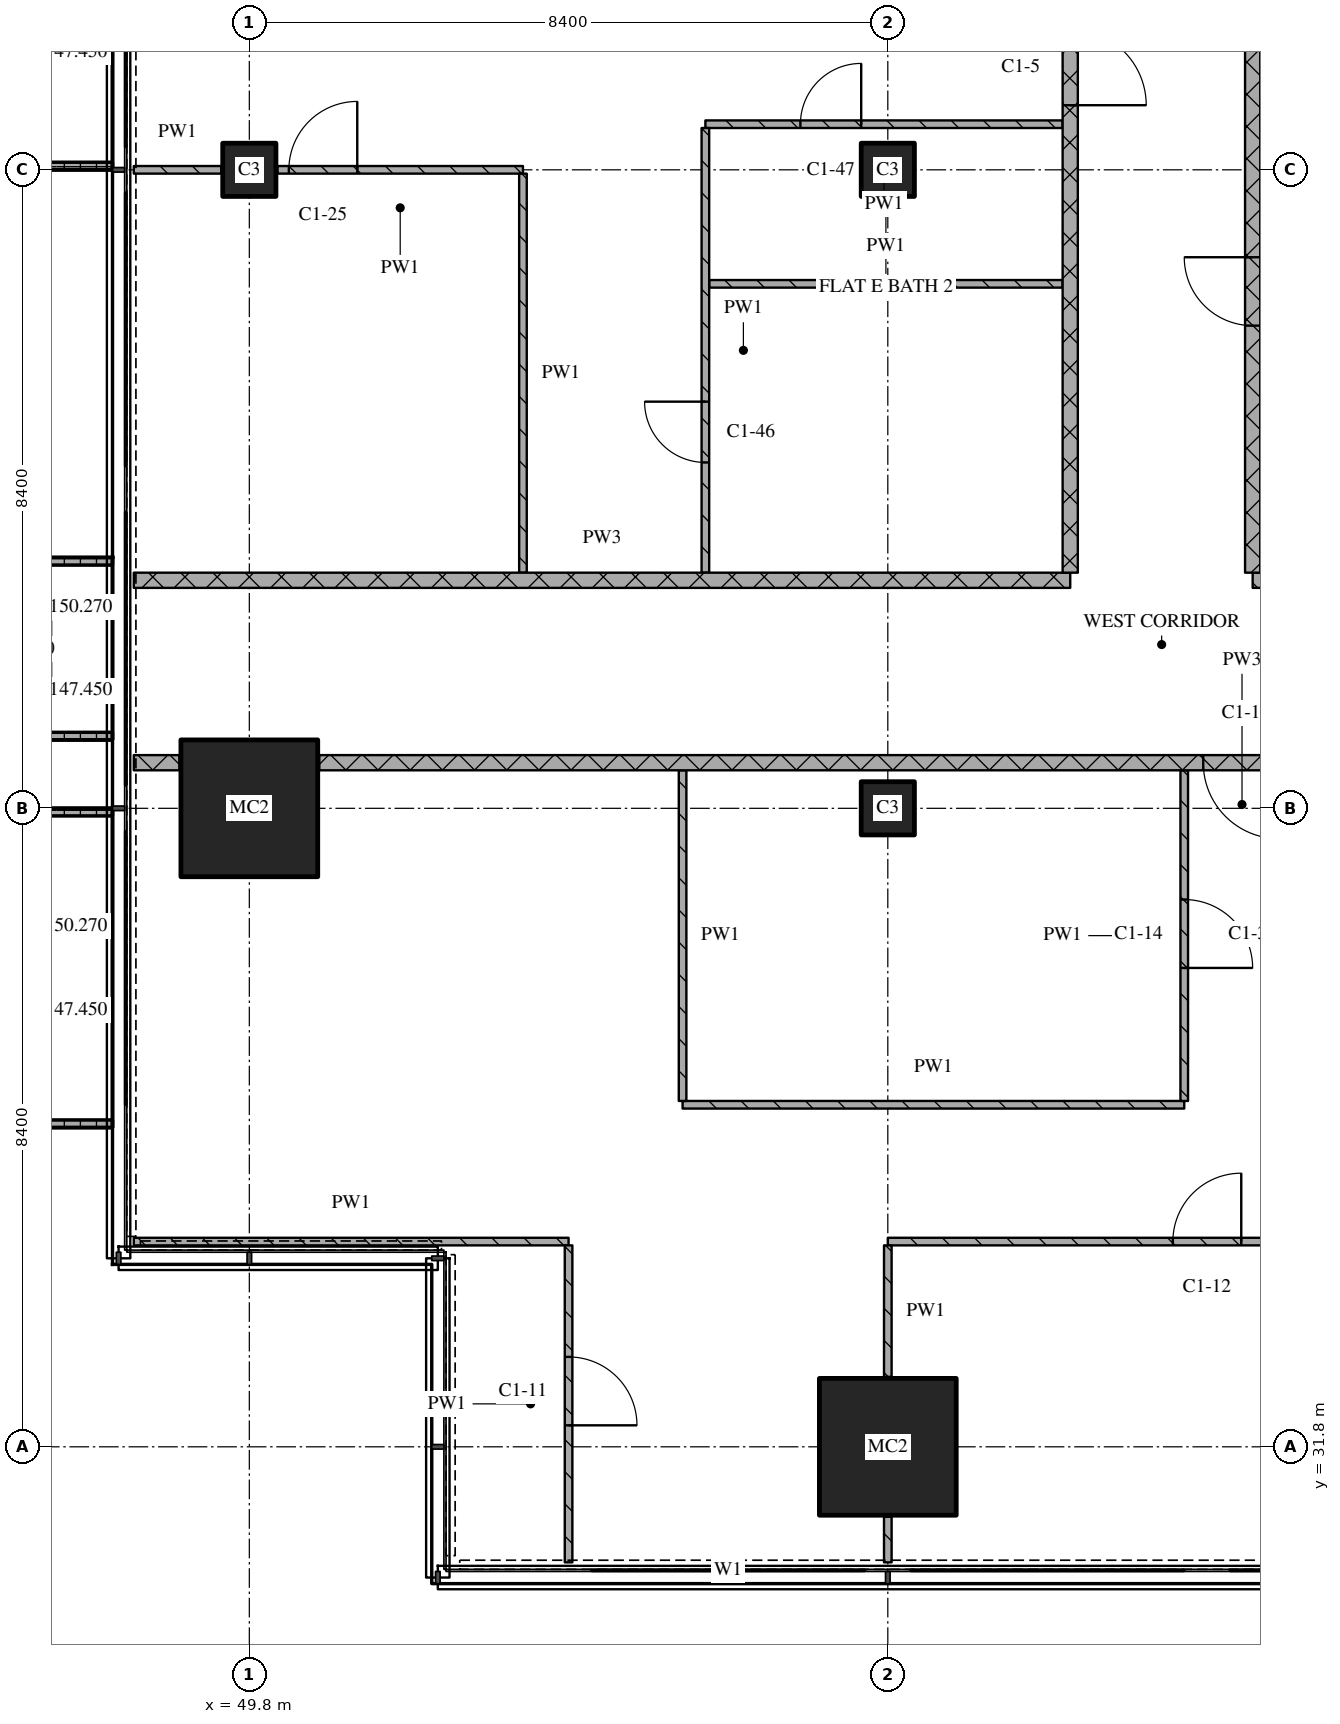
"""IFC4 building model, lengths in metres.
Left out: names, types, materials, properties, quantities, classifications, styles, units other than length and angle.
Written with IfcOpenShell. Run it as: python <this file> out.ifc"""

import sys

from ifc_helpers import new_model, si_unit, direction, frame, frame_2d, origin, origin_2d, place, context, subcontext, project, spatial, polyline, rectangle, outline, extrude, element, fill, save


model = new_model("IFC4")
c1 = context("Model", 3, precision=1e-05, world=origin(), true_north=direction((0.0, 1.0)))
c2 = subcontext(c1, "Body", "Model", "MODEL_VIEW")
j1 = project(units=[si_unit("LENGTHUNIT", "METRE"), si_unit("PLANEANGLEUNIT", "RADIAN")], contexts=[c1])
p1 = place(None, origin())
s1 = spatial("IfcSite", under=j1, at=p1, CompositionType="ELEMENT")
p2 = place(p1, origin())
s2 = spatial("IfcBuilding", under=s1, at=p2, CompositionType="ELEMENT")
p3 = place(p2, frame((0.0, 0.0, 147.45)))
s3 = spatial("IfcBuildingStorey", under=s2, at=p3, CompositionType="ELEMENT", Elevation=147.45)
p4 = place(p3, frame((49.8, 40.2, 0.0), z_axis=(0.0, 0.0, 1.0), x_axis=(1.0, 0.0, 0.0)))
e1 = element("IfcColumn", 1, at=p4, inside=s3, PredefinedType="COLUMN", context=c2, shape_type="SweptSolid", body=[
    extrude(rectangle(XDim=1.8, YDim=1.8, at=origin_2d()), origin(), (0.0, 0.0, 1.0), 3.6),
])
p5 = place(p3, frame((49.8, 48.6, 0.0), z_axis=(0.0, 0.0, 1.0), x_axis=(1.0, 0.0, 0.0)))
e2 = element("IfcColumn", 2, at=p5, inside=s3, PredefinedType="COLUMN", context=c2, shape_type="SweptSolid", body=[
    extrude(rectangle(XDim=0.7, YDim=0.7, at=origin_2d()), origin(), (0.0, 0.0, 1.0), 3.6),
])
p6 = place(p3, frame((58.2, 31.8, 0.0), z_axis=(0.0, 0.0, 1.0), x_axis=(1.0, 0.0, 0.0)))
e3 = element("IfcColumn", 3, at=p6, inside=s3, PredefinedType="COLUMN", context=c2, shape_type="SweptSolid", body=[
    extrude(rectangle(XDim=1.8, YDim=1.8, at=origin_2d()), origin(), (0.0, 0.0, 1.0), 3.6),
])
for number, where, z_axis, x_axis in (
    (4, (58.2, 40.2, 0.0), (0.0, 0.0, 1.0), (1.0, 0.0, 0.0)),
    (5, (58.2, 48.6, 0.0), (0.0, 0.0, 1.0), (1.0, 0.0, 0.0)),
):
    element("IfcColumn", number, at=place(p3, frame(where, z_axis=z_axis, x_axis=x_axis)), inside=s3, PredefinedType="COLUMN", context=c2, shape_type="SweptSolid", body=[
        extrude(rectangle(XDim=0.7, YDim=0.7, at=origin_2d()), origin(), (0.0, 0.0, 1.0), 3.6),
    ])
p7 = place(p3, origin())
e6 = element("IfcWall", 6, at=p7, inside=s3, PredefinedType="SOLIDWALL", context=c2, shape_type="SweptSolid", body=[
    extrude(outline(polyline([(48.0, 52.8), (48.0, 52.7), (46.367, 52.7), (46.367, 48.7), (48.0, 48.7), (48.0, 48.6), (46.267, 48.6), (46.267, 52.8), (48.0, 52.8)])), origin(), (0.0, 0.0, 1.0), 1.0),
])
p8 = place(p3, origin())
e7 = element("IfcWall", 7, at=p8, inside=s3, PredefinedType="SOLIDWALL", context=c2, shape_type="SweptSolid", body=[
    extrude(outline(polyline([(48.0, 43.5), (48.0, 43.4), (46.5, 43.4), (46.5, 41.2), (48.0, 41.2), (48.0, 41.1), (46.4, 41.1), (46.4, 43.5), (48.0, 43.5)])), origin(), (0.0, 0.0, 1.0), 1.0),
])
p9 = place(p3, origin())
e8 = element("IfcWall", 8, at=p9, inside=s3, PredefinedType="SOLIDWALL", context=c2, shape_type="SweptSolid", body=[
    extrude(outline(polyline([(48.0, 40.2), (48.0, 40.1), (46.367, 40.1), (46.367, 36.1), (48.0, 36.1), (48.0, 36.0), (46.267, 36.0), (46.267, 40.2), (48.0, 40.2)])), origin(), (0.0, 0.0, 1.0), 1.0),
])
p10 = place(p3, frame((48.28, 34.5, 0.0), z_axis=(0.0, 0.0, 1.0), x_axis=(1.0, 0.0, 0.0)))
e9 = element("IfcWall", 9, at=p10, inside=s3, PredefinedType="PARTITIONING", context=c2, shape_type="SweptSolid", body=[
    extrude(rectangle(XDim=5.72, YDim=0.1, at=frame_2d((2.86, 0.0))), origin(), (0.0, 0.0, 1.0), 3.32),
])
p11 = place(p3, frame((74.9, 34.5, 0.0), z_axis=(0.0, 0.0, 1.0), x_axis=(-1.0, 0.0, 0.0)))
e10 = element("IfcWall", 10, at=p11, inside=s3, PredefinedType="PARTITIONING", context=c2, shape_type="SweptSolid", body=[
    extrude(rectangle(XDim=16.7, YDim=0.1, at=frame_2d((8.35, 0.0))), origin(), (0.0, 0.0, 1.0), 3.32),
])
p12 = place(p11, frame((3.65, 0.0, 0.0)))
e11 = element("IfcOpeningElement", 11, at=p12, cuts=e10, PredefinedType="OPENING", context=c2, shape_type="SweptSolid", body=[
    extrude(rectangle(XDim=0.9, YDim=2.1, at=frame_2d((0.45, 1.05))), frame((0.0, 0.06, 0.0), z_axis=(0.0, -1.0, 0.0), x_axis=(1.0, 0.0, 0.0)), (0.0, 0.0, 1.0), 0.12),
])
p13 = place(p11, frame((12.05, 0.0, 0.0)))
e12 = element("IfcOpeningElement", 12, at=p13, cuts=e10, PredefinedType="OPENING", context=c2, shape_type="SweptSolid", body=[
    extrude(rectangle(XDim=0.9, YDim=2.1, at=frame_2d((0.45, 1.05))), frame((0.0, 0.06, 0.0), z_axis=(0.0, -1.0, 0.0), x_axis=(1.0, 0.0, 0.0)), (0.0, 0.0, 1.0), 0.12),
])
p14 = place(p3, frame((55.5, 36.3, 0.0), z_axis=(0.0, 0.0, 1.0), x_axis=(1.0, 0.0, 0.0)))
e13 = element("IfcWall", 13, at=p14, inside=s3, PredefinedType="PARTITIONING", context=c2, shape_type="SweptSolid", body=[
    extrude(rectangle(XDim=6.6, YDim=0.1, at=frame_2d((3.3, 0.0))), origin(), (0.0, 0.0, 1.0), 3.32),
])
p15 = place(p3, frame((48.28, 40.8, 0.0), z_axis=(0.0, 0.0, 1.0), x_axis=(1.0, 0.0, 0.0)))
e14 = element("IfcWall", 14, at=p15, inside=s3, PredefinedType="PARTITIONING", context=c2, shape_type="SweptSolid", body=[
    extrude(rectangle(XDim=0.6, YDim=0.2, at=frame_2d((0.3, 0.0))), origin(), (0.0, 0.0, 1.0), 3.32),
])
p16 = place(p3, frame((75.0, 40.8, 0.0), z_axis=(0.0, 0.0, 1.0), x_axis=(-1.0, 0.0, 0.0)))
e15 = element("IfcWall", 15, at=p16, inside=s3, PredefinedType="PARTITIONING", context=c2, shape_type="SweptSolid", body=[
    extrude(rectangle(XDim=24.28, YDim=0.2, at=frame_2d((12.14, 0.0))), origin(), (0.0, 0.0, 1.0), 3.32),
])
p17 = place(p16, frame((11.65, 0.0, 0.0)))
e16 = element("IfcOpeningElement", 16, at=p17, cuts=e15, PredefinedType="OPENING", context=c2, shape_type="SweptSolid", body=[
    extrude(rectangle(XDim=1.0, YDim=2.1, at=frame_2d((0.5, 1.05))), frame((0.0, 0.11, 0.0), z_axis=(0.0, -1.0, 0.0), x_axis=(1.0, 0.0, 0.0)), (0.0, 0.0, 1.0), 0.22),
])
p18 = place(p3, frame((48.28, 43.2, 0.0), z_axis=(0.0, 0.0, 1.0), x_axis=(1.0, 0.0, 0.0)))
e17 = element("IfcWall", 17, at=p18, inside=s3, PredefinedType="PARTITIONING", context=c2, shape_type="SweptSolid", body=[
    extrude(rectangle(XDim=12.32, YDim=0.2, at=frame_2d((6.16, 0.0))), origin(), (0.0, 0.0, 1.0), 3.32),
])
p19 = place(p3, frame((63.0, 43.2, 0.0), z_axis=(0.0, 0.0, 1.0), x_axis=(1.0, 0.0, 0.0)))
e18 = element("IfcWall", 18, at=p19, inside=s3, PredefinedType="PARTITIONING", context=c2, shape_type="SweptSolid", body=[
    extrude(rectangle(XDim=5.2, YDim=0.2, at=frame_2d((2.6, 0.0))), origin(), (0.0, 0.0, 1.0), 3.32),
])
p20 = place(p3, frame((55.85, 47.1, 0.0), z_axis=(0.0, 0.0, 1.0), x_axis=(1.0, 0.0, 0.0)))
e19 = element("IfcWall", 19, at=p20, inside=s3, PredefinedType="PARTITIONING", context=c2, shape_type="SweptSolid", body=[
    extrude(rectangle(XDim=4.65, YDim=0.1, at=frame_2d((2.325, 0.0))), origin(), (0.0, 0.0, 1.0), 3.32),
])
p21 = place(p3, frame((48.28, 48.6, 0.0), z_axis=(0.0, 0.0, 1.0), x_axis=(1.0, 0.0, 0.0)))
e20 = element("IfcWall", 20, at=p21, inside=s3, PredefinedType="PARTITIONING", context=c2, shape_type="SweptSolid", body=[
    extrude(rectangle(XDim=1.15, YDim=0.1, at=frame_2d((0.575, 0.0))), origin(), (0.0, 0.0, 1.0), 3.32),
])
p22 = place(p3, frame((53.4, 48.6, 0.0), z_axis=(0.0, 0.0, 1.0), x_axis=(-1.0, 0.0, 0.0)))
e21 = element("IfcWall", 21, at=p22, inside=s3, PredefinedType="PARTITIONING", context=c2, shape_type="SweptSolid", body=[
    extrude(rectangle(XDim=3.23, YDim=0.1, at=frame_2d((1.615, 0.0))), origin(), (0.0, 0.0, 1.0), 3.32),
])
p23 = place(p22, frame((2.18, 0.0, 0.0)))
e22 = element("IfcOpeningElement", 22, at=p23, cuts=e21, PredefinedType="OPENING", context=c2, shape_type="SweptSolid", body=[
    extrude(rectangle(XDim=0.9, YDim=2.1, at=frame_2d((0.45, 1.05))), frame((0.0, 0.06, 0.0), z_axis=(0.0, -1.0, 0.0), x_axis=(1.0, 0.0, 0.0)), (0.0, 0.0, 1.0), 0.12),
])
p24 = place(p3, frame((60.5, 49.2, 0.0), z_axis=(0.0, 0.0, 1.0), x_axis=(-1.0, 0.0, 0.0)))
e23 = element("IfcWall", 23, at=p24, inside=s3, PredefinedType="PARTITIONING", context=c2, shape_type="SweptSolid", body=[
    extrude(rectangle(XDim=4.7, YDim=0.1, at=frame_2d((2.35, 0.0))), origin(), (0.0, 0.0, 1.0), 3.32),
])
p25 = place(p24, frame((2.65, 0.0, 0.0)))
e24 = element("IfcOpeningElement", 24, at=p25, cuts=e23, PredefinedType="OPENING", context=c2, shape_type="SweptSolid", body=[
    extrude(rectangle(XDim=0.8, YDim=2.1, at=frame_2d((0.4, 1.05))), frame((0.0, 0.06, 0.0), z_axis=(0.0, -1.0, 0.0), x_axis=(1.0, 0.0, 0.0)), (0.0, 0.0, 1.0), 0.12),
])
p26 = place(p3, frame((53.4, 48.55, 0.0), z_axis=(0.0, 0.0, 1.0), x_axis=(0.0, -1.0, 0.0)))
e25 = element("IfcWall", 25, at=p26, inside=s3, PredefinedType="PARTITIONING", context=c2, shape_type="SweptSolid", body=[
    extrude(rectangle(XDim=5.25, YDim=0.1, at=frame_2d((2.625, 0.0))), origin(), (0.0, 0.0, 1.0), 3.32),
])
p27 = place(p3, frame((54.0, 30.28, 0.0), z_axis=(0.0, 0.0, 1.0), x_axis=(0.0, 1.0, 0.0)))
e26 = element("IfcWall", 26, at=p27, inside=s3, PredefinedType="PARTITIONING", context=c2, shape_type="SweptSolid", body=[
    extrude(rectangle(XDim=4.17, YDim=0.1, at=frame_2d((2.085, 0.0))), origin(), (0.0, 0.0, 1.0), 3.32),
])
p28 = place(p27, frame((1.803, 0.0, 0.0)))
e27 = element("IfcOpeningElement", 27, at=p28, cuts=e26, PredefinedType="OPENING", context=c2, shape_type="SweptSolid", body=[
    extrude(rectangle(XDim=0.9, YDim=2.1, at=frame_2d((0.45, 1.05))), frame((0.0, 0.06, 0.0), z_axis=(0.0, -1.0, 0.0), x_axis=(1.0, 0.0, 0.0)), (0.0, 0.0, 1.0), 0.12),
])
p29 = place(p3, frame((55.5, 40.7, 0.0), z_axis=(0.0, 0.0, 1.0), x_axis=(0.0, -1.0, 0.0)))
e28 = element("IfcWall", 28, at=p29, inside=s3, PredefinedType="PARTITIONING", context=c2, shape_type="SweptSolid", body=[
    extrude(rectangle(XDim=4.35, YDim=0.1, at=frame_2d((2.175, 0.0))), origin(), (0.0, 0.0, 1.0), 3.32),
])
p30 = place(p3, frame((55.8, 49.15, 0.0), z_axis=(0.0, 0.0, 1.0), x_axis=(0.0, -1.0, 0.0)))
e29 = element("IfcWall", 29, at=p30, inside=s3, PredefinedType="PARTITIONING", context=c2, shape_type="SweptSolid", body=[
    extrude(rectangle(XDim=5.85, YDim=0.1, at=frame_2d((2.925, 0.0))), origin(), (0.0, 0.0, 1.0), 3.32),
])
p31 = place(p30, frame((3.6, 0.0, 0.0)))
e30 = element("IfcOpeningElement", 30, at=p31, cuts=e29, PredefinedType="OPENING", context=c2, shape_type="SweptSolid", body=[
    extrude(rectangle(XDim=0.8, YDim=2.1, at=frame_2d((0.4, 1.05))), frame((0.0, 0.06, 0.0), z_axis=(0.0, -1.0, 0.0), x_axis=(1.0, 0.0, 0.0)), (0.0, 0.0, 1.0), 0.12),
])
p32 = place(p3, frame((58.2, 30.88, 0.0), z_axis=(0.0, 0.0, 1.0), x_axis=(0.0, -1.0, 0.0)))
e31 = element("IfcWall", 31, at=p32, inside=s3, PredefinedType="PARTITIONING", context=c2, shape_type="SweptSolid", body=[
    extrude(rectangle(XDim=0.6, YDim=0.1, at=frame_2d((0.3, 0.0))), origin(), (0.0, 0.0, 1.0), 3.32),
])
p33 = place(p3, frame((58.2, 34.45, 0.0), z_axis=(0.0, 0.0, 1.0), x_axis=(0.0, -1.0, 0.0)))
e32 = element("IfcWall", 32, at=p33, inside=s3, PredefinedType="PARTITIONING", context=c2, shape_type="SweptSolid", body=[
    extrude(rectangle(XDim=1.73, YDim=0.1, at=frame_2d((0.865, 0.0))), origin(), (0.0, 0.0, 1.0), 3.32),
])
p34 = place(p3, frame((60.6, 43.3, 0.0), z_axis=(0.0, 0.0, 1.0), x_axis=(0.0, 1.0, 0.0)))
e33 = element("IfcWall", 33, at=p34, inside=s3, PredefinedType="PARTITIONING", context=c2, shape_type="SweptSolid", body=[
    extrude(rectangle(XDim=17.8, YDim=0.2, at=frame_2d((8.9, 0.0))), origin(), (0.0, 0.0, 1.0), 3.32),
])
p35 = place(p34, frame((6.15, 0.0, 0.0)))
e34 = element("IfcOpeningElement", 34, at=p35, cuts=e33, PredefinedType="OPENING", context=c2, shape_type="SweptSolid", body=[
    extrude(rectangle(XDim=1.0, YDim=2.1, at=frame_2d((0.5, 1.05))), frame((0.0, 0.11, 0.0), z_axis=(0.0, -1.0, 0.0), x_axis=(1.0, 0.0, 0.0)), (0.0, 0.0, 1.0), 0.22),
])
p36 = place(p3, frame((62.1, 36.35, 0.0), z_axis=(0.0, 0.0, 1.0), x_axis=(0.0, 1.0, 0.0)))
e35 = element("IfcWall", 35, at=p36, inside=s3, PredefinedType="PARTITIONING", context=c2, shape_type="SweptSolid", body=[
    extrude(rectangle(XDim=4.35, YDim=0.1, at=frame_2d((2.175, 0.0))), origin(), (0.0, 0.0, 1.0), 3.32),
])
p37 = place(p36, frame((1.75, 0.0, 0.0)))
e36 = element("IfcOpeningElement", 36, at=p37, cuts=e35, PredefinedType="OPENING", context=c2, shape_type="SweptSolid", body=[
    extrude(rectangle(XDim=0.9, YDim=2.1, at=frame_2d((0.45, 1.05))), frame((0.0, 0.06, 0.0), z_axis=(0.0, -1.0, 0.0), x_axis=(1.0, 0.0, 0.0)), (0.0, 0.0, 1.0), 0.12),
])
p38 = place(p3, frame((63.0, 58.7, 0.0), z_axis=(0.0, 0.0, 1.0), x_axis=(0.0, -1.0, 0.0)))
e37 = element("IfcWall", 37, at=p38, inside=s3, PredefinedType="PARTITIONING", context=c2, shape_type="SweptSolid", body=[
    extrude(rectangle(XDim=15.4, YDim=0.2, at=frame_2d((7.7, 0.0))), origin(), (0.0, 0.0, 1.0), 3.32),
])
p39 = place(p38, frame((4.05, 0.0, 0.0)))
e38 = element("IfcOpeningElement", 38, at=p39, cuts=e37, PredefinedType="OPENING", context=c2, shape_type="SweptSolid", body=[
    extrude(rectangle(XDim=1.0, YDim=2.1, at=frame_2d((0.5, 1.05))), frame((0.0, 0.11, 0.0), z_axis=(0.0, -1.0, 0.0), x_axis=(1.0, 0.0, 0.0)), (0.0, 0.0, 1.0), 0.22),
])
p40 = place(p38, frame((11.25, 0.0, 0.0)))
e39 = element("IfcOpeningElement", 39, at=p40, cuts=e37, PredefinedType="OPENING", context=c2, shape_type="SweptSolid", body=[
    extrude(rectangle(XDim=0.9, YDim=2.1, at=frame_2d((0.45, 1.05))), frame((0.0, 0.11, 0.0), z_axis=(0.0, -1.0, 0.0), x_axis=(1.0, 0.0, 0.0)), (0.0, 0.0, 1.0), 0.22),
])
p41 = place(p13, origin())
e40 = element("IfcDoor", 40, at=p41, inside=s3, OperationType="SINGLE_SWING_RIGHT", PredefinedType="DOOR", context=c2, shape_type="SweptSolid", body=[
    extrude(rectangle(XDim=0.9, YDim=2.1, at=frame_2d((0.45, 1.05))), frame((0.0, 0.025, 0.0), z_axis=(0.0, -1.0, 0.0), x_axis=(1.0, 0.0, 0.0)), (0.0, 0.0, 1.0), 0.05),
])
fill(e12, e40)
p42 = place(p17, origin())
e41 = element("IfcDoor", 41, at=p42, inside=s3, OperationType="SINGLE_SWING_LEFT", PredefinedType="DOOR", context=c2, shape_type="SweptSolid", body=[
    extrude(rectangle(XDim=1.0, YDim=2.1, at=frame_2d((0.5, 1.05))), frame((0.0, 0.025, 0.0), z_axis=(0.0, -1.0, 0.0), x_axis=(1.0, 0.0, 0.0)), (0.0, 0.0, 1.0), 0.05),
])
fill(e16, e41)
p43 = place(p23, origin())
e42 = element("IfcDoor", 42, at=p43, inside=s3, OperationType="SINGLE_SWING_RIGHT", PredefinedType="DOOR", context=c2, shape_type="SweptSolid", body=[
    extrude(rectangle(XDim=0.9, YDim=2.1, at=frame_2d((0.45, 1.05))), frame((0.0, 0.025, 0.0), z_axis=(0.0, -1.0, 0.0), x_axis=(1.0, 0.0, 0.0)), (0.0, 0.0, 1.0), 0.05),
])
fill(e22, e42)
p44 = place(p25, origin())
e43 = element("IfcDoor", 43, at=p44, inside=s3, OperationType="SINGLE_SWING_RIGHT", PredefinedType="DOOR", context=c2, shape_type="SweptSolid", body=[
    extrude(rectangle(XDim=0.8, YDim=2.1, at=frame_2d((0.4, 1.05))), frame((0.0, 0.025, 0.0), z_axis=(0.0, -1.0, 0.0), x_axis=(1.0, 0.0, 0.0)), (0.0, 0.0, 1.0), 0.05),
])
fill(e24, e43)
p45 = place(p28, origin())
e44 = element("IfcDoor", 44, at=p45, inside=s3, OperationType="SINGLE_SWING_RIGHT", PredefinedType="DOOR", context=c2, shape_type="SweptSolid", body=[
    extrude(rectangle(XDim=0.9, YDim=2.1, at=frame_2d((0.45, 1.05))), frame((0.0, 0.025, 0.0), z_axis=(0.0, -1.0, 0.0), x_axis=(1.0, 0.0, 0.0)), (0.0, 0.0, 1.0), 0.05),
])
fill(e27, e44)
p46 = place(p31, origin())
e45 = element("IfcDoor", 45, at=p46, inside=s3, OperationType="SINGLE_SWING_RIGHT", PredefinedType="DOOR", context=c2, shape_type="SweptSolid", body=[
    extrude(rectangle(XDim=0.8, YDim=2.1, at=frame_2d((0.4, 1.05))), frame((0.0, 0.025, 0.0), z_axis=(0.0, -1.0, 0.0), x_axis=(1.0, 0.0, 0.0)), (0.0, 0.0, 1.0), 0.05),
])
fill(e30, e45)
p47 = place(p35, origin())
e46 = element("IfcDoor", 46, at=p47, inside=s3, OperationType="SINGLE_SWING_RIGHT", PredefinedType="DOOR", context=c2, shape_type="SweptSolid", body=[
    extrude(rectangle(XDim=1.0, YDim=2.1, at=frame_2d((0.5, 1.05))), frame((0.0, 0.025, 0.0), z_axis=(0.0, -1.0, 0.0), x_axis=(1.0, 0.0, 0.0)), (0.0, 0.0, 1.0), 0.05),
])
fill(e34, e46)
p48 = place(p37, origin())
e47 = element("IfcDoor", 47, at=p48, inside=s3, OperationType="SINGLE_SWING_RIGHT", PredefinedType="DOOR", context=c2, shape_type="SweptSolid", body=[
    extrude(rectangle(XDim=0.9, YDim=2.1, at=frame_2d((0.45, 1.05))), frame((0.0, 0.025, 0.0), z_axis=(0.0, -1.0, 0.0), x_axis=(1.0, 0.0, 0.0)), (0.0, 0.0, 1.0), 0.05),
])
fill(e36, e47)
p49 = place(p40, origin())
e48 = element("IfcDoor", 48, at=p49, inside=s3, OperationType="SINGLE_SWING_RIGHT", PredefinedType="DOOR", context=c2, shape_type="SweptSolid", body=[
    extrude(rectangle(XDim=0.9, YDim=2.1, at=frame_2d((0.45, 1.05))), frame((0.0, 0.025, 0.0), z_axis=(0.0, -1.0, 0.0), x_axis=(1.0, 0.0, 0.0)), (0.0, 0.0, 1.0), 0.05),
])
fill(e39, e48)
save(model, sys.argv[1])
